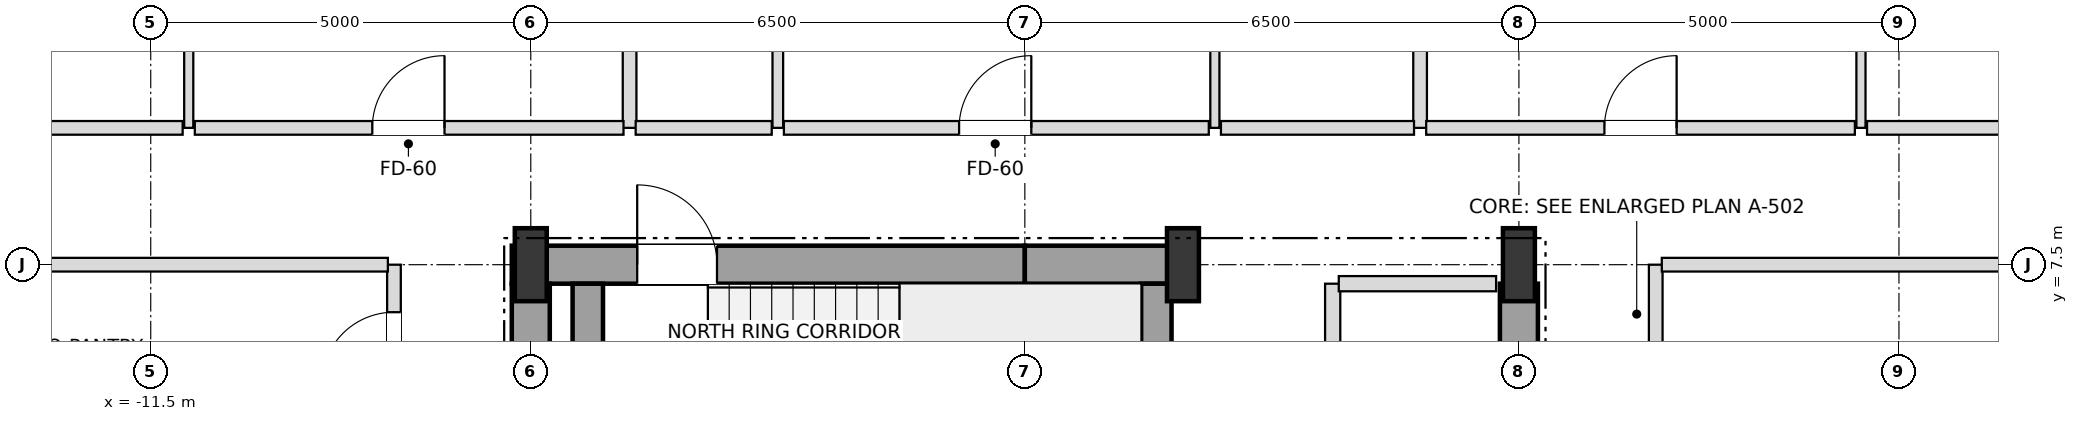
"""IFC4 building model, lengths in metres.
Left out: names, types, materials, properties, quantities, classifications, styles, units other than length and angle.
Written with IfcOpenShell. Run it as: python <this file> out.ifc"""

import sys

from ifc_helpers import new_model, si_unit, direction, frame, frame_2d, origin, origin_2d, place, context, subcontext, project, spatial, rectangle, i_section, extrude, element, fill, save


model = new_model("IFC4")
c1 = context("Model", 3, precision=1e-05, world=origin(), true_north=direction((0.0, 1.0)))
c2 = subcontext(c1, "Body", "Model", "MODEL_VIEW")
j1 = project(units=[si_unit("LENGTHUNIT", "METRE"), si_unit("PLANEANGLEUNIT", "RADIAN")], contexts=[c1])
p1 = place(None, origin())
s1 = spatial("IfcSite", under=j1, at=p1, CompositionType="ELEMENT")
p2 = place(p1, origin())
s2 = spatial("IfcBuilding", under=s1, at=p2, CompositionType="ELEMENT")
p3 = place(p2, frame((0.0, 0.0, 113.4)))
s3 = spatial("IfcBuildingStorey", under=s2, at=p3, CompositionType="ELEMENT", Elevation=113.4)
for number, where, z_axis, x_axis in (
    (1, (-6.5, 7.5, 0.0), (0.0, 0.0, 1.0), (1.0, 0.0, 0.0)),
    (2, (2.08, 7.5, 0.0), (0.0, 0.0, 1.0), (1.0, 0.0, 0.0)),
    (3, (6.5, 7.5, 0.0), (0.0, 0.0, 1.0), (1.0, 0.0, 0.0)),
):
    element("IfcColumn", number, at=place(p3, frame(where, z_axis=z_axis, x_axis=x_axis)), inside=s3, PredefinedType="COLUMN", context=c2, shape_type="SweptSolid", body=[
        extrude(i_section(OverallWidth=0.42, OverallDepth=0.96, WebThickness=0.022, FlangeThickness=0.034, at=origin_2d()), origin(), (0.0, 0.0, 1.0), 3.6),
    ])
p4 = place(p3, frame((-6.75, 7.5, 0.0), z_axis=(0.0, 0.0, 1.0), x_axis=(1.0, 0.0, 0.0)))
e4 = element("IfcWall", 4, at=p4, inside=s3, PredefinedType="SHEAR", context=c2, shape_type="SweptSolid", body=[
    extrude(rectangle(XDim=6.75, YDim=0.5, at=frame_2d((3.375, 0.0))), origin(), (0.0, 0.0, 1.0), 3.38),
])
p5 = place(p4, frame((1.65, 0.0, 0.0)))
e5 = element("IfcOpeningElement", 5, at=p5, cuts=e4, PredefinedType="OPENING", context=c2, shape_type="SweptSolid", body=[
    extrude(rectangle(XDim=1.05, YDim=2.15, at=frame_2d((0.525, 1.075))), frame((0.0, 0.26, 0.0), z_axis=(0.0, -1.0, 0.0), x_axis=(1.0, 0.0, 0.0)), (0.0, 0.0, 1.0), 0.52),
])
p6 = place(p3, frame((0.0, 7.5, 0.0), z_axis=(0.0, 0.0, 1.0), x_axis=(1.0, 0.0, 0.0)))
e6 = element("IfcWall", 6, at=p6, inside=s3, PredefinedType="SHEAR", context=c2, shape_type="SweptSolid", body=[
    extrude(rectangle(XDim=2.08, YDim=0.5, at=frame_2d((1.04, 0.0))), origin(), (0.0, 0.0, 1.0), 3.38),
])
for number, where, z_axis, x_axis in (
    (7, (-6.5, 3.95, 0.0), (0.0, 0.0, 1.0), (0.0, 1.0, 0.0)),
    (8, (6.5, 3.95, 0.0), (0.0, 0.0, 1.0), (0.0, 1.0, 0.0)),
):
    element("IfcWall", number, at=place(p3, frame(where, z_axis=z_axis, x_axis=x_axis)), inside=s3, PredefinedType="SHEAR", context=c2, shape_type="SweptSolid", body=[
        extrude(rectangle(XDim=3.3, YDim=0.5, at=frame_2d((1.65, 0.0))), origin(), (0.0, 0.0, 1.0), 3.38),
    ])
for number, where, z_axis, x_axis in (
    (9, (1.73, 3.95, 0.0), (0.0, 0.0, 1.0), (0.0, 1.0, 0.0)),
    (10, (-5.75, 3.95, 0.0), (0.0, 0.0, 1.0), (0.0, 1.0, 0.0)),
):
    element("IfcWall", number, at=place(p3, frame(where, z_axis=z_axis, x_axis=x_axis)), inside=s3, PredefinedType="SHEAR", context=c2, shape_type="SweptSolid", body=[
        extrude(rectangle(XDim=3.3, YDim=0.4, at=frame_2d((1.65, 0.0))), origin(), (0.0, 0.0, 1.0), 3.38),
    ])
p7 = place(p3, frame((-11.0, 9.3, 0.0), z_axis=(0.0, 0.0, 1.0), x_axis=(0.0, 1.0, 0.0)))
e11 = element("IfcWall", 11, at=p7, inside=s3, PredefinedType="PARTITIONING", context=c2, shape_type="SweptSolid", body=[
    extrude(rectangle(XDim=7.85, YDim=0.12, at=frame_2d((3.925, 0.0))), origin(), (0.0, 0.0, 1.0), 2.816),
])
p8 = place(p7, frame((4.219, 0.0, 0.0)))
e12 = element("IfcOpeningElement", 12, at=p8, cuts=e11, PredefinedType="OPENING", context=c2, shape_type="SweptSolid", body=[
    extrude(rectangle(XDim=0.95, YDim=2.1, at=frame_2d((0.475, 1.05))), frame((0.0, 0.07, 0.0), z_axis=(0.0, -1.0, 0.0), x_axis=(1.0, 0.0, 0.0)), (0.0, 0.0, 1.0), 0.14),
])
p9 = place(p3, frame((-8.3, -7.5, 0.0), z_axis=(0.0, 0.0, 1.0), x_axis=(0.0, 1.0, 0.0)))
e13 = element("IfcWall", 13, at=p9, inside=s3, PredefinedType="PARTITIONING", context=c2, shape_type="SweptSolid", body=[
    extrude(rectangle(XDim=15.0, YDim=0.18, at=frame_2d((7.5, 0.0))), origin(), (0.0, 0.0, 1.0), 3.38),
])
p10 = place(p9, frame((2.075, 0.0, 0.0)))
e14 = element("IfcOpeningElement", 14, at=p10, cuts=e13, PredefinedType="OPENING", context=c2, shape_type="SweptSolid", body=[
    extrude(rectangle(XDim=0.95, YDim=2.15, at=frame_2d((0.475, 1.075))), frame((0.0, 0.1, 0.0), z_axis=(0.0, -1.0, 0.0), x_axis=(1.0, 0.0, 0.0)), (0.0, 0.0, 1.0), 0.2),
])
p11 = place(p9, frame((8.475, 0.0, 0.0)))
e15 = element("IfcOpeningElement", 15, at=p11, cuts=e13, PredefinedType="OPENING", context=c2, shape_type="SweptSolid", body=[
    extrude(rectangle(XDim=0.95, YDim=2.15, at=frame_2d((0.475, 1.075))), frame((0.0, 0.1, 0.0), z_axis=(0.0, -1.0, 0.0), x_axis=(1.0, 0.0, 0.0)), (0.0, 0.0, 1.0), 0.2),
])
p12 = place(p9, frame((13.425, 0.0, 0.0)))
e16 = element("IfcOpeningElement", 16, at=p12, cuts=e13, PredefinedType="OPENING", context=c2, shape_type="SweptSolid", body=[
    extrude(rectangle(XDim=0.95, YDim=2.15, at=frame_2d((0.475, 1.075))), frame((0.0, 0.1, 0.0), z_axis=(0.0, -1.0, 0.0), x_axis=(1.0, 0.0, 0.0)), (0.0, 0.0, 1.0), 0.2),
])
p13 = place(p3, frame((-5.2, 9.3, 0.0), z_axis=(0.0, 0.0, 1.0), x_axis=(0.0, 1.0, 0.0)))
e17 = element("IfcWall", 17, at=p13, inside=s3, PredefinedType="PARTITIONING", context=c2, shape_type="SweptSolid", body=[
    extrude(rectangle(XDim=13.85, YDim=0.18, at=frame_2d((6.925, 0.0))), origin(), (0.0, 0.0, 1.0), 2.816),
])
p14 = place(p3, frame((-3.25, 9.3, 0.0), z_axis=(0.0, 0.0, 1.0), x_axis=(0.0, 1.0, 0.0)))
e18 = element("IfcWall", 18, at=p14, inside=s3, PredefinedType="PARTITIONING", context=c2, shape_type="SweptSolid", body=[
    extrude(rectangle(XDim=7.85, YDim=0.14, at=frame_2d((3.925, 0.0))), origin(), (0.0, 0.0, 1.0), 3.38),
])
p15 = place(p14, frame((3.47, 0.0, 0.0)))
e19 = element("IfcOpeningElement", 19, at=p15, cuts=e18, PredefinedType="OPENING", context=c2, shape_type="SweptSolid", body=[
    extrude(rectangle(XDim=0.9, YDim=2.1, at=frame_2d((0.45, 1.05))), frame((0.0, 0.08, 0.0), z_axis=(0.0, -1.0, 0.0), x_axis=(1.0, 0.0, 0.0)), (0.0, 0.0, 1.0), 0.16),
])
p16 = place(p3, frame((2.5, 9.3, 0.0), z_axis=(0.0, 0.0, 1.0), x_axis=(0.0, 1.0, 0.0)))
e20 = element("IfcWall", 20, at=p16, inside=s3, PredefinedType="PARTITIONING", context=c2, shape_type="SweptSolid", body=[
    extrude(rectangle(XDim=7.85, YDim=0.12, at=frame_2d((3.925, 0.0))), origin(), (0.0, 0.0, 1.0), 3.38),
])
p17 = place(p16, frame((3.445, 0.0, 0.0)))
e21 = element("IfcOpeningElement", 21, at=p17, cuts=e20, PredefinedType="OPENING", context=c2, shape_type="SweptSolid", body=[
    extrude(rectangle(XDim=0.95, YDim=2.1, at=frame_2d((0.475, 1.05))), frame((0.0, 0.07, 0.0), z_axis=(0.0, -1.0, 0.0), x_axis=(1.0, 0.0, 0.0)), (0.0, 0.0, 1.0), 0.14),
])
p18 = place(p3, frame((4.05, 4.2, 0.0), z_axis=(0.0, 0.0, 1.0), x_axis=(0.0, 1.0, 0.0)))
e22 = element("IfcWall", 22, at=p18, inside=s3, PredefinedType="SOLIDWALL", context=c2, shape_type="SweptSolid", body=[
    extrude(rectangle(XDim=3.05, YDim=0.2, at=frame_2d((1.525, 0.0))), origin(), (0.0, 0.0, 1.0), 3.38),
])
p19 = place(p18, frame((0.975, 0.0, 0.0)))
e23 = element("IfcOpeningElement", 23, at=p19, cuts=e22, PredefinedType="OPENING", context=c2, shape_type="SweptSolid", body=[
    extrude(rectangle(XDim=0.95, YDim=2.15, at=frame_2d((0.475, 1.075))), frame((0.0, 0.11, 0.0), z_axis=(0.0, -1.0, 0.0), x_axis=(1.0, 0.0, 0.0)), (0.0, 0.0, 1.0), 0.22),
])
p20 = place(p3, frame((5.2, 9.3, 0.0), z_axis=(0.0, 0.0, 1.0), x_axis=(0.0, 1.0, 0.0)))
e24 = element("IfcWall", 24, at=p20, inside=s3, PredefinedType="PARTITIONING", context=c2, shape_type="SweptSolid", body=[
    extrude(rectangle(XDim=13.85, YDim=0.18, at=frame_2d((6.925, 0.0))), origin(), (0.0, 0.0, 1.0), 2.816),
])
p21 = place(p3, frame((8.3, -7.5, 0.0), z_axis=(0.0, 0.0, 1.0), x_axis=(0.0, 1.0, 0.0)))
e25 = element("IfcWall", 25, at=p21, inside=s3, PredefinedType="PARTITIONING", context=c2, shape_type="SweptSolid", body=[
    extrude(rectangle(XDim=15.0, YDim=0.18, at=frame_2d((7.5, 0.0))), origin(), (0.0, 0.0, 1.0), 3.38),
])
p22 = place(p21, frame((3.475, 0.0, 0.0)))
e26 = element("IfcOpeningElement", 26, at=p22, cuts=e25, PredefinedType="OPENING", context=c2, shape_type="SweptSolid", body=[
    extrude(rectangle(XDim=0.95, YDim=2.15, at=frame_2d((0.475, 1.075))), frame((0.0, 0.1, 0.0), z_axis=(0.0, -1.0, 0.0), x_axis=(1.0, 0.0, 0.0)), (0.0, 0.0, 1.0), 0.2),
])
p23 = place(p3, frame((11.0, 9.3, 0.0), z_axis=(0.0, 0.0, 1.0), x_axis=(0.0, 1.0, 0.0)))
e27 = element("IfcWall", 27, at=p23, inside=s3, PredefinedType="PARTITIONING", context=c2, shape_type="SweptSolid", body=[
    extrude(rectangle(XDim=7.85, YDim=0.12, at=frame_2d((3.925, 0.0))), origin(), (0.0, 0.0, 1.0), 2.816),
])
p24 = place(p23, frame((4.219, 0.0, 0.0)))
e28 = element("IfcOpeningElement", 28, at=p24, cuts=e27, PredefinedType="OPENING", context=c2, shape_type="SweptSolid", body=[
    extrude(rectangle(XDim=0.95, YDim=2.1, at=frame_2d((0.475, 1.05))), frame((0.0, 0.07, 0.0), z_axis=(0.0, -1.0, 0.0), x_axis=(1.0, 0.0, 0.0)), (0.0, 0.0, 1.0), 0.14),
])
p25 = place(p3, frame((4.13, 7.25, 0.0), z_axis=(0.0, 0.0, 1.0), x_axis=(1.0, 0.0, 0.0)))
e29 = element("IfcWall", 29, at=p25, inside=s3, PredefinedType="SOLIDWALL", context=c2, shape_type="SweptSolid", body=[
    extrude(rectangle(XDim=2.07, YDim=0.2, at=frame_2d((1.035, 0.0))), origin(), (0.0, 0.0, 1.0), 3.38),
])
p26 = place(p3, frame((-20.15, 7.5, 0.0), z_axis=(0.0, 0.0, 1.0), x_axis=(1.0, 0.0, 0.0)))
e30 = element("IfcWall", 30, at=p26, inside=s3, PredefinedType="PARTITIONING", context=c2, shape_type="SweptSolid", body=[
    extrude(rectangle(XDim=11.77, YDim=0.18, at=frame_2d((5.885, 0.0))), origin(), (0.0, 0.0, 1.0), 2.816),
])
p27 = place(p3, frame((8.38, 7.5, 0.0), z_axis=(0.0, 0.0, 1.0), x_axis=(1.0, 0.0, 0.0)))
e31 = element("IfcWall", 31, at=p27, inside=s3, PredefinedType="PARTITIONING", context=c2, shape_type="SweptSolid", body=[
    extrude(rectangle(XDim=5.89, YDim=0.18, at=frame_2d((2.945, 0.0))), origin(), (0.0, 0.0, 1.0), 2.816),
])
p28 = place(p3, frame((-13.62, 9.3, 0.0), z_axis=(0.0, 0.0, 1.0), x_axis=(1.0, 0.0, 0.0)))
e32 = element("IfcWall", 32, at=p28, inside=s3, PredefinedType="PARTITIONING", context=c2, shape_type="SweptSolid", body=[
    extrude(rectangle(XDim=2.54, YDim=0.18, at=frame_2d((1.27, 0.0))), origin(), (0.0, 0.0, 1.0), 3.38),
])
p29 = place(p3, frame((-10.92, 9.3, 0.0), z_axis=(0.0, 0.0, 1.0), x_axis=(1.0, 0.0, 0.0)))
e33 = element("IfcWall", 33, at=p29, inside=s3, PredefinedType="PARTITIONING", context=c2, shape_type="SweptSolid", body=[
    extrude(rectangle(XDim=5.64, YDim=0.18, at=frame_2d((2.82, 0.0))), origin(), (0.0, 0.0, 1.0), 2.816),
])
p30 = place(p29, frame((2.335, 0.0, 0.0)))
e34 = element("IfcOpeningElement", 34, at=p30, cuts=e33, PredefinedType="OPENING", context=c2, shape_type="SweptSolid", body=[
    extrude(rectangle(XDim=0.95, YDim=2.15, at=frame_2d((0.475, 1.075))), frame((0.0, 0.1, 0.0), z_axis=(0.0, -1.0, 0.0), x_axis=(1.0, 0.0, 0.0)), (0.0, 0.0, 1.0), 0.2),
])
p31 = place(p3, frame((-5.12, 9.3, 0.0), z_axis=(0.0, 0.0, 1.0), x_axis=(1.0, 0.0, 0.0)))
e35 = element("IfcWall", 35, at=p31, inside=s3, PredefinedType="PARTITIONING", context=c2, shape_type="SweptSolid", body=[
    extrude(rectangle(XDim=1.79, YDim=0.18, at=frame_2d((0.895, 0.0))), origin(), (0.0, 0.0, 1.0), 3.38),
])
p32 = place(p3, frame((-3.17, 9.3, 0.0), z_axis=(0.0, 0.0, 1.0), x_axis=(1.0, 0.0, 0.0)))
e36 = element("IfcWall", 36, at=p32, inside=s3, PredefinedType="PARTITIONING", context=c2, shape_type="SweptSolid", body=[
    extrude(rectangle(XDim=5.59, YDim=0.18, at=frame_2d((2.795, 0.0))), origin(), (0.0, 0.0, 1.0), 3.38),
])
p33 = place(p32, frame((2.305, 0.0, 0.0)))
e37 = element("IfcOpeningElement", 37, at=p33, cuts=e36, PredefinedType="OPENING", context=c2, shape_type="SweptSolid", body=[
    extrude(rectangle(XDim=0.95, YDim=2.15, at=frame_2d((0.475, 1.075))), frame((0.0, 0.1, 0.0), z_axis=(0.0, -1.0, 0.0), x_axis=(1.0, 0.0, 0.0)), (0.0, 0.0, 1.0), 0.2),
])
p34 = place(p3, frame((2.58, 9.3, 0.0), z_axis=(0.0, 0.0, 1.0), x_axis=(1.0, 0.0, 0.0)))
e38 = element("IfcWall", 38, at=p34, inside=s3, PredefinedType="PARTITIONING", context=c2, shape_type="SweptSolid", body=[
    extrude(rectangle(XDim=2.54, YDim=0.18, at=frame_2d((1.27, 0.0))), origin(), (0.0, 0.0, 1.0), 3.38),
])
p35 = place(p3, frame((5.28, 9.3, 0.0), z_axis=(0.0, 0.0, 1.0), x_axis=(1.0, 0.0, 0.0)))
e39 = element("IfcWall", 39, at=p35, inside=s3, PredefinedType="PARTITIONING", context=c2, shape_type="SweptSolid", body=[
    extrude(rectangle(XDim=5.64, YDim=0.18, at=frame_2d((2.82, 0.0))), origin(), (0.0, 0.0, 1.0), 2.816),
])
p36 = place(p35, frame((2.345, 0.0, 0.0)))
e40 = element("IfcOpeningElement", 40, at=p36, cuts=e39, PredefinedType="OPENING", context=c2, shape_type="SweptSolid", body=[
    extrude(rectangle(XDim=0.95, YDim=2.15, at=frame_2d((0.475, 1.075))), frame((0.0, 0.1, 0.0), z_axis=(0.0, -1.0, 0.0), x_axis=(1.0, 0.0, 0.0)), (0.0, 0.0, 1.0), 0.2),
])
p37 = place(p3, frame((11.08, 9.3, 0.0), z_axis=(0.0, 0.0, 1.0), x_axis=(1.0, 0.0, 0.0)))
e41 = element("IfcWall", 41, at=p37, inside=s3, PredefinedType="PARTITIONING", context=c2, shape_type="SweptSolid", body=[
    extrude(rectangle(XDim=2.54, YDim=0.18, at=frame_2d((1.27, 0.0))), origin(), (0.0, 0.0, 1.0), 3.38),
])
p38 = place(p5, origin())
e42 = element("IfcDoor", 42, at=p38, inside=s3, OperationType="SINGLE_SWING_LEFT", PredefinedType="DOOR", context=c2, shape_type="SweptSolid", body=[
    extrude(rectangle(XDim=1.05, YDim=2.15, at=frame_2d((0.525, 1.075))), frame((0.0, 0.025, 0.0), z_axis=(0.0, -1.0, 0.0), x_axis=(1.0, 0.0, 0.0)), (0.0, 0.0, 1.0), 0.05),
])
fill(e5, e42)
p39 = place(p30, origin())
e43 = element("IfcDoor", 43, at=p39, inside=s3, OperationType="SINGLE_SWING_RIGHT", PredefinedType="DOOR", context=c2, shape_type="SweptSolid", body=[
    extrude(rectangle(XDim=0.95, YDim=2.15, at=frame_2d((0.475, 1.075))), frame((0.0, 0.025, 0.0), z_axis=(0.0, -1.0, 0.0), x_axis=(1.0, 0.0, 0.0)), (0.0, 0.0, 1.0), 0.05),
])
fill(e34, e43)
p40 = place(p33, origin())
e44 = element("IfcDoor", 44, at=p40, inside=s3, OperationType="SINGLE_SWING_RIGHT", PredefinedType="DOOR", context=c2, shape_type="SweptSolid", body=[
    extrude(rectangle(XDim=0.95, YDim=2.15, at=frame_2d((0.475, 1.075))), frame((0.0, 0.025, 0.0), z_axis=(0.0, -1.0, 0.0), x_axis=(1.0, 0.0, 0.0)), (0.0, 0.0, 1.0), 0.05),
])
fill(e37, e44)
p41 = place(p36, origin())
e45 = element("IfcDoor", 45, at=p41, inside=s3, OperationType="SINGLE_SWING_RIGHT", PredefinedType="DOOR", context=c2, shape_type="SweptSolid", body=[
    extrude(rectangle(XDim=0.95, YDim=2.15, at=frame_2d((0.475, 1.075))), frame((0.0, 0.025, 0.0), z_axis=(0.0, -1.0, 0.0), x_axis=(1.0, 0.0, 0.0)), (0.0, 0.0, 1.0), 0.05),
])
fill(e40, e45)
p42 = place(p12, origin())
e46 = element("IfcDoor", 46, at=p42, inside=s3, OperationType="SINGLE_SWING_LEFT", PredefinedType="DOOR", context=c2, shape_type="SweptSolid", body=[
    extrude(rectangle(XDim=0.95, YDim=2.15, at=frame_2d((0.475, 1.075))), frame((0.0, 0.025, 0.0), z_axis=(0.0, -1.0, 0.0), x_axis=(1.0, 0.0, 0.0)), (0.0, 0.0, 1.0), 0.05),
])
fill(e16, e46)
save(model, sys.argv[1])
